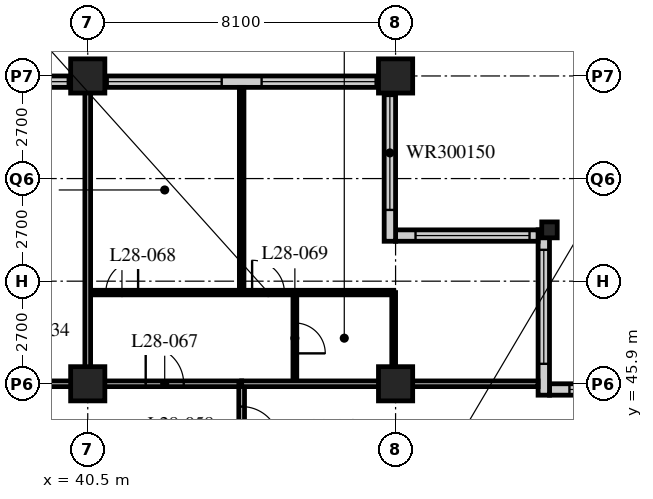
"""IFC4 building model, lengths in metres.
Left out: names, types, materials, properties, quantities, classifications, styles, units other than length and angle.
Written with IfcOpenShell. Run it as: python <this file> out.ifc"""

import sys

from ifc_helpers import new_model, si_unit, direction, frame, frame_2d, origin, origin_2d, place, context, subcontext, project, spatial, rectangle, hollow_rectangle, i_section, extrude, element, fill, save


model = new_model("IFC4")
c1 = context("Model", 3, precision=1e-05, world=origin(), true_north=direction((0.0, 1.0)))
c2 = subcontext(c1, "Body", "Model", "MODEL_VIEW")
j1 = project(units=[si_unit("LENGTHUNIT", "METRE"), si_unit("PLANEANGLEUNIT", "RADIAN")], contexts=[c1])
p1 = place(None, origin())
s1 = spatial("IfcSite", under=j1, at=p1, CompositionType="ELEMENT")
p2 = place(p1, origin())
s2 = spatial("IfcBuilding", under=s1, at=p2, CompositionType="ELEMENT")
p3 = place(p2, frame((0.0, 0.0, 113.6)))
s3 = spatial("IfcBuildingStorey", under=s2, at=p3, CompositionType="ELEMENT", Elevation=113.6)
for number, where, z_axis, x_axis in (
    (1, (40.5, 45.9, 0.0), (0.0, 0.0, 1.0), (1.0, 0.0, 0.0)),
    (2, (40.5, 54.0, 0.0), (0.0, 0.0, 1.0), (1.0, 0.0, 0.0)),
    (3, (48.6, 45.9, 0.0), (0.0, 0.0, 1.0), (1.0, 0.0, 0.0)),
    (4, (48.6, 54.0, 0.0), (0.0, 0.0, 1.0), (1.0, 0.0, 0.0)),
):
    element("IfcColumn", number, at=place(p3, frame(where, z_axis=z_axis, x_axis=x_axis)), inside=s3, PredefinedType="COLUMN", context=c2, shape_type="SweptSolid", body=[
        extrude(hollow_rectangle(XDim=0.9, YDim=0.9, WallThickness=0.09, at=origin_2d()), origin(), (0.0, 0.0, 1.0), 3.4),
    ])
p4 = place(p3, frame((52.65, 49.95, 0.0), z_axis=(0.0, 0.0, 1.0), x_axis=(1.0, 0.0, 0.0)))
e5 = element("IfcColumn", 5, at=p4, inside=s3, PredefinedType="COLUMN", context=c2, shape_type="SweptSolid", body=[
    extrude(i_section(OverallWidth=0.407, OverallDepth=0.419, WebThickness=0.031, FlangeThickness=0.049, FilletRadius=0.015, at=origin_2d()), origin(), (0.0, 0.0, 1.0), 3.4),
])
p5 = place(p3, frame((56.4, 45.75, 0.0), z_axis=(0.0, 0.0, 1.0), x_axis=(-1.0, 0.0, 0.0)))
e6 = element("IfcWall", 6, at=p5, inside=s3, PredefinedType="SOLIDWALL", context=c2, shape_type="SweptSolid", body=[
    extrude(rectangle(XDim=3.75, YDim=0.3, at=frame_2d((1.875, 0.0))), origin(), (0.0, 0.0, 1.0), 3.19),
])
p6 = place(p5, frame((0.225, 0.0, 0.9)))
e7 = element("IfcOpeningElement", 7, at=p6, cuts=e6, PredefinedType="OPENING", context=c2, shape_type="SweptSolid", body=[
    extrude(rectangle(XDim=3.0, YDim=1.5, at=frame_2d((1.5, 0.75))), frame((0.0, 0.16, 0.0), z_axis=(0.0, -1.0, 0.0), x_axis=(1.0, 0.0, 0.0)), (0.0, 0.0, 1.0), 0.32),
])
p7 = place(p3, frame((52.5, 45.6, 0.0), z_axis=(0.0, 0.0, 1.0), x_axis=(0.0, 1.0, 0.0)))
e8 = element("IfcWall", 8, at=p7, inside=s3, PredefinedType="SOLIDWALL", context=c2, shape_type="SweptSolid", body=[
    extrude(rectangle(XDim=4.35, YDim=0.3, at=frame_2d((2.175, 0.0))), origin(), (0.0, 0.0, 1.0), 3.19),
])
p8 = place(p7, frame((0.825, 0.0, 0.9)))
e9 = element("IfcOpeningElement", 9, at=p8, cuts=e8, PredefinedType="OPENING", context=c2, shape_type="SweptSolid", body=[
    extrude(rectangle(XDim=3.0, YDim=1.5, at=frame_2d((1.5, 0.75))), frame((0.0, 0.16, 0.0), z_axis=(0.0, -1.0, 0.0), x_axis=(1.0, 0.0, 0.0)), (0.0, 0.0, 1.0), 0.32),
])
p9 = place(p3, frame((52.35, 49.8, 0.0), z_axis=(0.0, 0.0, 1.0), x_axis=(-1.0, 0.0, 0.0)))
e10 = element("IfcWall", 10, at=p9, inside=s3, PredefinedType="SOLIDWALL", context=c2, shape_type="SweptSolid", body=[
    extrude(rectangle(XDim=3.75, YDim=0.3, at=frame_2d((1.875, 0.0))), origin(), (0.0, 0.0, 1.0), 3.19),
])
p10 = place(p9, frame((0.225, 0.0, 0.9)))
e11 = element("IfcOpeningElement", 11, at=p10, cuts=e10, PredefinedType="OPENING", context=c2, shape_type="SweptSolid", body=[
    extrude(rectangle(XDim=3.0, YDim=1.5, at=frame_2d((1.5, 0.75))), frame((0.0, 0.16, 0.0), z_axis=(0.0, -1.0, 0.0), x_axis=(1.0, 0.0, 0.0)), (0.0, 0.0, 1.0), 0.32),
])
p11 = place(p3, frame((48.45, 49.65, 0.0), z_axis=(0.0, 0.0, 1.0), x_axis=(0.0, 1.0, 0.0)))
e12 = element("IfcWall", 12, at=p11, inside=s3, PredefinedType="SOLIDWALL", context=c2, shape_type="SweptSolid", body=[
    extrude(rectangle(XDim=4.35, YDim=0.3, at=frame_2d((2.175, 0.0))), origin(), (0.0, 0.0, 1.0), 3.19),
])
p12 = place(p11, frame((0.825, 0.0, 0.9)))
e13 = element("IfcOpeningElement", 13, at=p12, cuts=e12, PredefinedType="OPENING", context=c2, shape_type="SweptSolid", body=[
    extrude(rectangle(XDim=3.0, YDim=1.5, at=frame_2d((1.5, 0.75))), frame((0.0, 0.16, 0.0), z_axis=(0.0, -1.0, 0.0), x_axis=(1.0, 0.0, 0.0)), (0.0, 0.0, 1.0), 0.32),
])
p13 = place(p3, frame((48.3, 53.85, 0.0), z_axis=(0.0, 0.0, 1.0), x_axis=(-1.0, 0.0, 0.0)))
e14 = element("IfcWall", 14, at=p13, inside=s3, PredefinedType="SOLIDWALL", context=c2, shape_type="SweptSolid", body=[
    extrude(rectangle(XDim=40.2, YDim=0.3, at=frame_2d((20.1, 0.0))), origin(), (0.0, 0.0, 1.0), 3.19),
])
p14 = place(p13, frame((0.225, 0.0, 0.9)))
e15 = element("IfcOpeningElement", 15, at=p14, cuts=e14, PredefinedType="OPENING", context=c2, shape_type="SweptSolid", body=[
    extrude(rectangle(XDim=3.0, YDim=2.0, at=frame_2d((1.5, 1.0))), frame((0.0, 0.16, 0.0), z_axis=(0.0, -1.0, 0.0), x_axis=(1.0, 0.0, 0.0)), (0.0, 0.0, 1.0), 0.32),
])
p15 = place(p13, frame((4.275, 0.0, 0.9)))
e16 = element("IfcOpeningElement", 16, at=p15, cuts=e14, PredefinedType="OPENING", context=c2, shape_type="SweptSolid", body=[
    extrude(rectangle(XDim=3.0, YDim=2.0, at=frame_2d((1.5, 1.0))), frame((0.0, 0.16, 0.0), z_axis=(0.0, -1.0, 0.0), x_axis=(1.0, 0.0, 0.0)), (0.0, 0.0, 1.0), 0.32),
])
p16 = place(p13, frame((8.325, 0.0, 0.9)))
e17 = element("IfcOpeningElement", 17, at=p16, cuts=e14, PredefinedType="OPENING", context=c2, shape_type="SweptSolid", body=[
    extrude(rectangle(XDim=3.0, YDim=2.0, at=frame_2d((1.5, 1.0))), frame((0.0, 0.16, 0.0), z_axis=(0.0, -1.0, 0.0), x_axis=(1.0, 0.0, 0.0)), (0.0, 0.0, 1.0), 0.32),
])
p17 = place(p13, frame((12.375, 0.0, 0.9)))
e18 = element("IfcOpeningElement", 18, at=p17, cuts=e14, PredefinedType="OPENING", context=c2, shape_type="SweptSolid", body=[
    extrude(rectangle(XDim=3.0, YDim=2.0, at=frame_2d((1.5, 1.0))), frame((0.0, 0.16, 0.0), z_axis=(0.0, -1.0, 0.0), x_axis=(1.0, 0.0, 0.0)), (0.0, 0.0, 1.0), 0.32),
])
p18 = place(p13, frame((16.425, 0.0, 0.9)))
e19 = element("IfcOpeningElement", 19, at=p18, cuts=e14, PredefinedType="OPENING", context=c2, shape_type="SweptSolid", body=[
    extrude(rectangle(XDim=3.0, YDim=2.0, at=frame_2d((1.5, 1.0))), frame((0.0, 0.16, 0.0), z_axis=(0.0, -1.0, 0.0), x_axis=(1.0, 0.0, 0.0)), (0.0, 0.0, 1.0), 0.32),
])
p19 = place(p13, frame((20.475, 0.0, 0.9)))
e20 = element("IfcOpeningElement", 20, at=p19, cuts=e14, PredefinedType="OPENING", context=c2, shape_type="SweptSolid", body=[
    extrude(rectangle(XDim=3.0, YDim=2.0, at=frame_2d((1.5, 1.0))), frame((0.0, 0.16, 0.0), z_axis=(0.0, -1.0, 0.0), x_axis=(1.0, 0.0, 0.0)), (0.0, 0.0, 1.0), 0.32),
])
p20 = place(p13, frame((24.525, 0.0, 0.9)))
e21 = element("IfcOpeningElement", 21, at=p20, cuts=e14, PredefinedType="OPENING", context=c2, shape_type="SweptSolid", body=[
    extrude(rectangle(XDim=3.0, YDim=2.0, at=frame_2d((1.5, 1.0))), frame((0.0, 0.16, 0.0), z_axis=(0.0, -1.0, 0.0), x_axis=(1.0, 0.0, 0.0)), (0.0, 0.0, 1.0), 0.32),
])
p21 = place(p13, frame((28.575, 0.0, 0.9)))
e22 = element("IfcOpeningElement", 22, at=p21, cuts=e14, PredefinedType="OPENING", context=c2, shape_type="SweptSolid", body=[
    extrude(rectangle(XDim=3.0, YDim=2.0, at=frame_2d((1.5, 1.0))), frame((0.0, 0.16, 0.0), z_axis=(0.0, -1.0, 0.0), x_axis=(1.0, 0.0, 0.0)), (0.0, 0.0, 1.0), 0.32),
])
p22 = place(p13, frame((32.625, 0.0, 0.9)))
e23 = element("IfcOpeningElement", 23, at=p22, cuts=e14, PredefinedType="OPENING", context=c2, shape_type="SweptSolid", body=[
    extrude(rectangle(XDim=3.0, YDim=2.0, at=frame_2d((1.5, 1.0))), frame((0.0, 0.16, 0.0), z_axis=(0.0, -1.0, 0.0), x_axis=(1.0, 0.0, 0.0)), (0.0, 0.0, 1.0), 0.32),
])
p23 = place(p13, frame((36.675, 0.0, 0.9)))
e24 = element("IfcOpeningElement", 24, at=p23, cuts=e14, PredefinedType="OPENING", context=c2, shape_type="SweptSolid", body=[
    extrude(rectangle(XDim=3.0, YDim=2.0, at=frame_2d((1.5, 1.0))), frame((0.0, 0.16, 0.0), z_axis=(0.0, -1.0, 0.0), x_axis=(1.0, 0.0, 0.0)), (0.0, 0.0, 1.0), 0.32),
])
p24 = place(p3, frame((12.15, 45.9, 0.0), z_axis=(0.0, 0.0, 1.0), x_axis=(1.0, 0.0, 0.0)))
e25 = element("IfcWall", 25, at=p24, inside=s3, PredefinedType="PARTITIONING", context=c2, shape_type="SweptSolid", body=[
    extrude(rectangle(XDim=32.4, YDim=0.15, at=frame_2d((16.2, 0.0))), origin(), (0.0, 0.0, 1.0), 2.578),
])
p25 = place(p24, frame((5.95, 0.0, 0.0)))
e26 = element("IfcOpeningElement", 26, at=p25, cuts=e25, PredefinedType="OPENING", context=c2, shape_type="SweptSolid", body=[
    extrude(rectangle(XDim=1.0, YDim=2.1, at=frame_2d((0.5, 1.05))), frame((0.0, 0.085, 0.0), z_axis=(0.0, -1.0, 0.0), x_axis=(1.0, 0.0, 0.0)), (0.0, 0.0, 1.0), 0.17),
])
p26 = place(p24, frame((14.05, 0.0, 0.0)))
e27 = element("IfcOpeningElement", 27, at=p26, cuts=e25, PredefinedType="OPENING", context=c2, shape_type="SweptSolid", body=[
    extrude(rectangle(XDim=1.0, YDim=2.1, at=frame_2d((0.5, 1.05))), frame((0.0, 0.085, 0.0), z_axis=(0.0, -1.0, 0.0), x_axis=(1.0, 0.0, 0.0)), (0.0, 0.0, 1.0), 0.17),
])
p27 = place(p24, frame((25.7, 0.0, 0.0)))
e28 = element("IfcOpeningElement", 28, at=p27, cuts=e25, PredefinedType="OPENING", context=c2, shape_type="SweptSolid", body=[
    extrude(rectangle(XDim=1.0, YDim=2.1, at=frame_2d((0.5, 1.05))), frame((0.0, 0.085, 0.0), z_axis=(0.0, -1.0, 0.0), x_axis=(1.0, 0.0, 0.0)), (0.0, 0.0, 1.0), 0.17),
])
p28 = place(p24, frame((29.875, 0.0, 0.0)))
e29 = element("IfcOpeningElement", 29, at=p28, cuts=e25, PredefinedType="OPENING", context=c2, shape_type="SweptSolid", body=[
    extrude(rectangle(XDim=1.0, YDim=2.1, at=frame_2d((0.5, 1.05))), frame((0.0, 0.085, 0.0), z_axis=(0.0, -1.0, 0.0), x_axis=(1.0, 0.0, 0.0)), (0.0, 0.0, 1.0), 0.17),
])
p29 = place(p24, frame((1.525, 0.0, 0.0)))
e30 = element("IfcOpeningElement", 30, at=p29, cuts=e25, PredefinedType="OPENING", context=c2, shape_type="SweptSolid", body=[
    extrude(rectangle(XDim=1.0, YDim=2.1, at=frame_2d((0.5, 1.05))), frame((0.0, 0.085, 0.0), z_axis=(0.0, -1.0, 0.0), x_axis=(1.0, 0.0, 0.0)), (0.0, 0.0, 1.0), 0.17),
])
p30 = place(p3, frame((44.55, 17.55, 0.0), z_axis=(0.0, 0.0, 1.0), x_axis=(0.0, 1.0, 0.0)))
e31 = element("IfcWall", 31, at=p30, inside=s3, PredefinedType="PARTITIONING", context=c2, shape_type="SweptSolid", body=[
    extrude(rectangle(XDim=28.35, YDim=0.15, at=frame_2d((14.175, 0.0))), origin(), (0.0, 0.0, 1.0), 3.19),
])
p31 = place(p30, frame((2.75, 0.0, 0.0)))
e32 = element("IfcOpeningElement", 32, at=p31, cuts=e31, PredefinedType="OPENING", context=c2, shape_type="SweptSolid", body=[
    extrude(rectangle(XDim=1.0, YDim=2.1, at=frame_2d((0.5, 1.05))), frame((0.0, 0.085, 0.0), z_axis=(0.0, -1.0, 0.0), x_axis=(1.0, 0.0, 0.0)), (0.0, 0.0, 1.0), 0.17),
])
p32 = place(p30, frame((6.5, 0.0, 0.0)))
e33 = element("IfcOpeningElement", 33, at=p32, cuts=e31, PredefinedType="OPENING", context=c2, shape_type="SweptSolid", body=[
    extrude(rectangle(XDim=1.0, YDim=2.1, at=frame_2d((0.5, 1.05))), frame((0.0, 0.085, 0.0), z_axis=(0.0, -1.0, 0.0), x_axis=(1.0, 0.0, 0.0)), (0.0, 0.0, 1.0), 0.17),
])
p33 = place(p30, frame((10.0, 0.0, 0.0)))
e34 = element("IfcOpeningElement", 34, at=p33, cuts=e31, PredefinedType="OPENING", context=c2, shape_type="SweptSolid", body=[
    extrude(rectangle(XDim=1.0, YDim=2.1, at=frame_2d((0.5, 1.05))), frame((0.0, 0.085, 0.0), z_axis=(0.0, -1.0, 0.0), x_axis=(1.0, 0.0, 0.0)), (0.0, 0.0, 1.0), 0.17),
])
p34 = place(p30, frame((21.65, 0.0, 0.0)))
e35 = element("IfcOpeningElement", 35, at=p34, cuts=e31, PredefinedType="OPENING", context=c2, shape_type="SweptSolid", body=[
    extrude(rectangle(XDim=1.0, YDim=2.1, at=frame_2d((0.5, 1.05))), frame((0.0, 0.085, 0.0), z_axis=(0.0, -1.0, 0.0), x_axis=(1.0, 0.0, 0.0)), (0.0, 0.0, 1.0), 0.17),
])
p35 = place(p30, frame((26.75, 0.0, 0.0)))
e36 = element("IfcOpeningElement", 36, at=p35, cuts=e31, PredefinedType="OPENING", context=c2, shape_type="SweptSolid", body=[
    extrude(rectangle(XDim=1.0, YDim=2.1, at=frame_2d((0.5, 1.05))), frame((0.0, 0.085, 0.0), z_axis=(0.0, -1.0, 0.0), x_axis=(1.0, 0.0, 0.0)), (0.0, 0.0, 1.0), 0.17),
])
p36 = place(p3, frame((40.5, 48.3, 0.0), z_axis=(0.0, 0.0, 1.0), x_axis=(1.0, 0.0, 0.0)))
e37 = element("IfcWall", 37, at=p36, inside=s3, PredefinedType="PARTITIONING", context=c2, shape_type="SweptSolid", body=[
    extrude(rectangle(XDim=8.05, YDim=0.12, at=frame_2d((4.025, 0.0))), origin(), (0.0, 0.0, 1.0), 3.19),
])
p37 = place(p36, frame((0.475, 0.0, 0.0)))
e38 = element("IfcOpeningElement", 38, at=p37, cuts=e37, PredefinedType="OPENING", context=c2, shape_type="SweptSolid", body=[
    extrude(rectangle(XDim=0.85, YDim=2.1, at=frame_2d((0.425, 1.05))), frame((0.0, 0.07, 0.0), z_axis=(0.0, -1.0, 0.0), x_axis=(1.0, 0.0, 0.0)), (0.0, 0.0, 1.0), 0.14),
])
p38 = place(p36, frame((4.325, 0.0, 0.0)))
e39 = element("IfcOpeningElement", 39, at=p38, cuts=e37, PredefinedType="OPENING", context=c2, shape_type="SweptSolid", body=[
    extrude(rectangle(XDim=0.85, YDim=2.1, at=frame_2d((0.425, 1.05))), frame((0.0, 0.07, 0.0), z_axis=(0.0, -1.0, 0.0), x_axis=(1.0, 0.0, 0.0)), (0.0, 0.0, 1.0), 0.14),
])
p39 = place(p3, frame((45.95, 45.9, 0.0), z_axis=(0.0, 0.0, 1.0), x_axis=(0.0, 1.0, 0.0)))
e40 = element("IfcWall", 40, at=p39, inside=s3, PredefinedType="PARTITIONING", context=c2, shape_type="SweptSolid", body=[
    extrude(rectangle(XDim=2.4, YDim=0.1, at=frame_2d((1.2, 0.0))), origin(), (0.0, 0.0, 1.0), 3.19),
])
p40 = place(p39, frame((0.8, 0.0, 0.0)))
e41 = element("IfcOpeningElement", 41, at=p40, cuts=e40, PredefinedType="OPENING", context=c2, shape_type="SweptSolid", body=[
    extrude(rectangle(XDim=0.8, YDim=2.1, at=frame_2d((0.4, 1.05))), frame((0.0, 0.06, 0.0), z_axis=(0.0, -1.0, 0.0), x_axis=(1.0, 0.0, 0.0)), (0.0, 0.0, 1.0), 0.12),
])
p41 = place(p3, frame((48.55, 45.9, 0.0), z_axis=(0.0, 0.0, 1.0), x_axis=(0.0, 1.0, 0.0)))
e42 = element("IfcWall", 42, at=p41, inside=s3, PredefinedType="PARTITIONING", context=c2, shape_type="SweptSolid", body=[
    extrude(rectangle(XDim=2.4, YDim=0.1, at=frame_2d((1.2, 0.0))), origin(), (0.0, 0.0, 1.0), 2.578),
])
p42 = place(p3, frame((44.55, 48.3, 0.0), z_axis=(0.0, 0.0, 1.0), x_axis=(0.0, 1.0, 0.0)))
e43 = element("IfcWall", 43, at=p42, inside=s3, PredefinedType="PARTITIONING", context=c2, shape_type="SweptSolid", body=[
    extrude(rectangle(XDim=5.4, YDim=0.12, at=frame_2d((2.7, 0.0))), origin(), (0.0, 0.0, 1.0), 3.19),
])
for number, where, z_axis, x_axis in (
    (44, (44.55, 45.9, 0.0), (0.0, 0.0, 1.0), (1.0, 0.0, 0.0)),
    (45, (40.5, 45.9, 0.0), (0.0, 0.0, 1.0), (0.0, 1.0, 0.0)),
):
    element("IfcWall", number, at=place(p3, frame(where, z_axis=z_axis, x_axis=x_axis)), inside=s3, PredefinedType="PARTITIONING", context=c2, shape_type="SweptSolid", body=[
        extrude(rectangle(XDim=7.8, YDim=0.15, at=frame_2d((3.9, 0.0))), origin(), (0.0, 0.0, 1.0), 2.578),
    ])
p43 = place(p6, origin())
e46 = element("IfcWindow", 46, at=p43, inside=s3, PartitioningType="SINGLE_PANEL", PredefinedType="WINDOW", context=c2, shape_type="SweptSolid", body=[
    extrude(rectangle(XDim=3.0, YDim=1.5, at=frame_2d((1.5, 0.75))), frame((0.0, 0.03, 0.0), z_axis=(0.0, -1.0, 0.0), x_axis=(1.0, 0.0, 0.0)), (0.0, 0.0, 1.0), 0.06),
])
fill(e7, e46)
p44 = place(p8, origin())
e47 = element("IfcWindow", 47, at=p44, inside=s3, PartitioningType="SINGLE_PANEL", PredefinedType="WINDOW", context=c2, shape_type="SweptSolid", body=[
    extrude(rectangle(XDim=3.0, YDim=1.5, at=frame_2d((1.5, 0.75))), frame((0.0, 0.03, 0.0), z_axis=(0.0, -1.0, 0.0), x_axis=(1.0, 0.0, 0.0)), (0.0, 0.0, 1.0), 0.06),
])
fill(e9, e47)
p45 = place(p10, origin())
e48 = element("IfcWindow", 48, at=p45, inside=s3, PartitioningType="SINGLE_PANEL", PredefinedType="WINDOW", context=c2, shape_type="SweptSolid", body=[
    extrude(rectangle(XDim=3.0, YDim=1.5, at=frame_2d((1.5, 0.75))), frame((0.0, 0.03, 0.0), z_axis=(0.0, -1.0, 0.0), x_axis=(1.0, 0.0, 0.0)), (0.0, 0.0, 1.0), 0.06),
])
fill(e11, e48)
p46 = place(p12, origin())
e49 = element("IfcWindow", 49, at=p46, inside=s3, PartitioningType="SINGLE_PANEL", PredefinedType="WINDOW", context=c2, shape_type="SweptSolid", body=[
    extrude(rectangle(XDim=3.0, YDim=1.5, at=frame_2d((1.5, 0.75))), frame((0.0, 0.03, 0.0), z_axis=(0.0, -1.0, 0.0), x_axis=(1.0, 0.0, 0.0)), (0.0, 0.0, 1.0), 0.06),
])
fill(e13, e49)
p47 = place(p14, origin())
e50 = element("IfcWindow", 50, at=p47, inside=s3, PartitioningType="SINGLE_PANEL", PredefinedType="WINDOW", context=c2, shape_type="SweptSolid", body=[
    extrude(rectangle(XDim=3.0, YDim=2.0, at=frame_2d((1.5, 1.0))), frame((0.0, 0.03, 0.0), z_axis=(0.0, -1.0, 0.0), x_axis=(1.0, 0.0, 0.0)), (0.0, 0.0, 1.0), 0.06),
])
fill(e15, e50)
p48 = place(p15, origin())
e51 = element("IfcWindow", 51, at=p48, inside=s3, PartitioningType="SINGLE_PANEL", PredefinedType="WINDOW", context=c2, shape_type="SweptSolid", body=[
    extrude(rectangle(XDim=3.0, YDim=2.0, at=frame_2d((1.5, 1.0))), frame((0.0, 0.03, 0.0), z_axis=(0.0, -1.0, 0.0), x_axis=(1.0, 0.0, 0.0)), (0.0, 0.0, 1.0), 0.06),
])
fill(e16, e51)
p49 = place(p16, origin())
e52 = element("IfcWindow", 52, at=p49, inside=s3, PartitioningType="SINGLE_PANEL", PredefinedType="WINDOW", context=c2, shape_type="SweptSolid", body=[
    extrude(rectangle(XDim=3.0, YDim=2.0, at=frame_2d((1.5, 1.0))), frame((0.0, 0.03, 0.0), z_axis=(0.0, -1.0, 0.0), x_axis=(1.0, 0.0, 0.0)), (0.0, 0.0, 1.0), 0.06),
])
fill(e17, e52)
p50 = place(p35, origin())
e53 = element("IfcDoor", 53, at=p50, inside=s3, OperationType="SINGLE_SWING_RIGHT", PredefinedType="DOOR", context=c2, shape_type="SweptSolid", body=[
    extrude(rectangle(XDim=1.0, YDim=2.1, at=frame_2d((0.5, 1.05))), frame((0.0, 0.025, 0.0), z_axis=(0.0, -1.0, 0.0), x_axis=(1.0, 0.0, 0.0)), (0.0, 0.0, 1.0), 0.05),
])
fill(e36, e53)
p51 = place(p28, origin())
e54 = element("IfcDoor", 54, at=p51, inside=s3, OperationType="SINGLE_SWING_LEFT", PredefinedType="DOOR", context=c2, shape_type="SweptSolid", body=[
    extrude(rectangle(XDim=1.0, YDim=2.1, at=frame_2d((0.5, 1.05))), frame((0.0, 0.025, 0.0), z_axis=(0.0, -1.0, 0.0), x_axis=(1.0, 0.0, 0.0)), (0.0, 0.0, 1.0), 0.05),
])
fill(e29, e54)
p52 = place(p37, origin())
e55 = element("IfcDoor", 55, at=p52, inside=s3, OperationType="SINGLE_SWING_RIGHT", PredefinedType="DOOR", context=c2, shape_type="SweptSolid", body=[
    extrude(rectangle(XDim=0.85, YDim=2.1, at=frame_2d((0.425, 1.05))), frame((0.0, 0.025, 0.0), z_axis=(0.0, -1.0, 0.0), x_axis=(1.0, 0.0, 0.0)), (0.0, 0.0, 1.0), 0.05),
])
fill(e38, e55)
p53 = place(p40, origin())
e56 = element("IfcDoor", 56, at=p53, inside=s3, OperationType="SINGLE_SWING_RIGHT", PredefinedType="DOOR", context=c2, shape_type="SweptSolid", body=[
    extrude(rectangle(XDim=0.8, YDim=2.1, at=frame_2d((0.4, 1.05))), frame((0.0, 0.025, 0.0), z_axis=(0.0, -1.0, 0.0), x_axis=(1.0, 0.0, 0.0)), (0.0, 0.0, 1.0), 0.05),
])
fill(e41, e56)
p54 = place(p38, origin())
e57 = element("IfcDoor", 57, at=p54, inside=s3, OperationType="SINGLE_SWING_LEFT", PredefinedType="DOOR", context=c2, shape_type="SweptSolid", body=[
    extrude(rectangle(XDim=0.85, YDim=2.1, at=frame_2d((0.425, 1.05))), frame((0.0, 0.025, 0.0), z_axis=(0.0, -1.0, 0.0), x_axis=(1.0, 0.0, 0.0)), (0.0, 0.0, 1.0), 0.05),
])
fill(e39, e57)
save(model, sys.argv[1])
